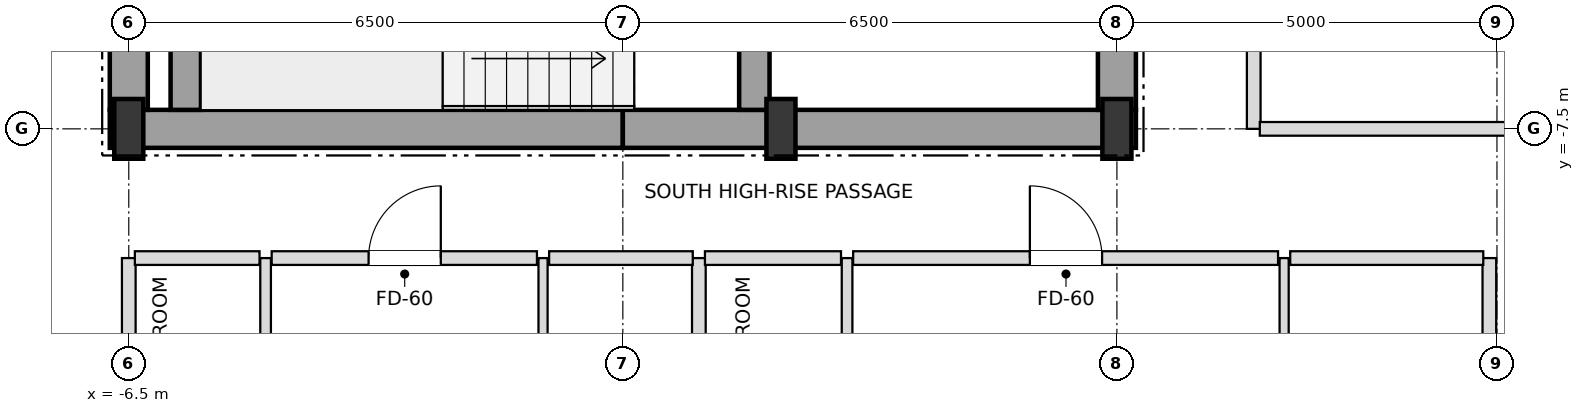
"""IFC4 building model, lengths in metres.
Left out: names, types, materials, properties, quantities, classifications, styles, units other than length and angle.
Written with IfcOpenShell. Run it as: python <this file> out.ifc"""

import sys

from ifc_helpers import new_model, si_unit, direction, frame, frame_2d, origin, origin_2d, place, context, subcontext, project, spatial, rectangle, i_section, extrude, element, fill, save


model = new_model("IFC4")
c1 = context("Model", 3, precision=1e-05, world=origin(), true_north=direction((0.0, 1.0)))
c2 = subcontext(c1, "Body", "Model", "MODEL_VIEW")
j1 = project(units=[si_unit("LENGTHUNIT", "METRE"), si_unit("PLANEANGLEUNIT", "RADIAN")], contexts=[c1])
p1 = place(None, origin())
s1 = spatial("IfcSite", under=j1, at=p1, CompositionType="ELEMENT")
p2 = place(p1, origin())
s2 = spatial("IfcBuilding", under=s1, at=p2, CompositionType="ELEMENT")
p3 = place(p2, frame((0.0, 0.0, 297.9)))
s3 = spatial("IfcBuildingStorey", under=s2, at=p3, CompositionType="ELEMENT", Elevation=297.9)
for number, where, z_axis, x_axis in (
    (1, (-6.5, -7.5, 0.0), (0.0, 0.0, 1.0), (1.0, 0.0, 0.0)),
    (2, (2.08, -7.5, 0.0), (0.0, 0.0, 1.0), (1.0, 0.0, 0.0)),
    (3, (6.5, -7.5, 0.0), (0.0, 0.0, 1.0), (1.0, 0.0, 0.0)),
):
    element("IfcColumn", number, at=place(p3, frame(where, z_axis=z_axis, x_axis=x_axis)), inside=s3, PredefinedType="COLUMN", context=c2, shape_type="SweptSolid", body=[
        extrude(i_section(OverallWidth=0.382, OverallDepth=0.786, WebThickness=0.02, FlangeThickness=0.033, at=origin_2d()), origin(), (0.0, 0.0, 1.0), 3.6),
    ])
for number, where, z_axis, x_axis in (
    (4, (-6.75, -7.5, 0.0), (0.0, 0.0, 1.0), (1.0, 0.0, 0.0)),
    (5, (0.0, -7.5, 0.0), (0.0, 0.0, 1.0), (1.0, 0.0, 0.0)),
):
    element("IfcWall", number, at=place(p3, frame(where, z_axis=z_axis, x_axis=x_axis)), inside=s3, PredefinedType="SHEAR", context=c2, shape_type="SweptSolid", body=[
        extrude(rectangle(XDim=6.75, YDim=0.5, at=frame_2d((3.375, 0.0))), origin(), (0.0, 0.0, 1.0), 3.38),
    ])
p4 = place(p3, frame((-6.5, -7.25, 0.0), z_axis=(0.0, 0.0, 1.0), x_axis=(0.0, 1.0, 0.0)))
e6 = element("IfcWall", 6, at=p4, inside=s3, PredefinedType="SHEAR", context=c2, shape_type="SweptSolid", body=[
    extrude(rectangle(XDim=3.55, YDim=0.5, at=frame_2d((1.775, 0.0))), origin(), (0.0, 0.0, 1.0), 3.38),
])
p5 = place(p3, frame((6.5, -7.25, 0.0), z_axis=(0.0, 0.0, 1.0), x_axis=(0.0, 1.0, 0.0)))
e7 = element("IfcWall", 7, at=p5, inside=s3, PredefinedType="SHEAR", context=c2, shape_type="SweptSolid", body=[
    extrude(rectangle(XDim=5.75, YDim=0.5, at=frame_2d((2.875, 0.0))), origin(), (0.0, 0.0, 1.0), 3.38),
])
p6 = place(p5, frame((0.85, 0.0, 0.0)))
e8 = element("IfcOpeningElement", 8, at=p6, cuts=e7, PredefinedType="OPENING", context=c2, shape_type="SweptSolid", body=[
    extrude(rectangle(XDim=1.05, YDim=2.15, at=frame_2d((0.525, 1.075))), frame((0.0, 0.26, 0.0), z_axis=(0.0, -1.0, 0.0), x_axis=(1.0, 0.0, 0.0)), (0.0, 0.0, 1.0), 0.52),
])
p7 = place(p3, frame((-5.75, -7.25, 0.0), z_axis=(0.0, 0.0, 1.0), x_axis=(0.0, 1.0, 0.0)))
e9 = element("IfcWall", 9, at=p7, inside=s3, PredefinedType="SHEAR", context=c2, shape_type="SweptSolid", body=[
    extrude(rectangle(XDim=2.9, YDim=0.4, at=frame_2d((1.45, 0.0))), origin(), (0.0, 0.0, 1.0), 3.38),
])
p8 = place(p3, frame((1.73, -7.25, 0.0), z_axis=(0.0, 0.0, 1.0), x_axis=(0.0, 1.0, 0.0)))
e10 = element("IfcWall", 10, at=p8, inside=s3, PredefinedType="SHEAR", context=c2, shape_type="SweptSolid", body=[
    extrude(rectangle(XDim=3.3, YDim=0.4, at=frame_2d((1.65, 0.0))), origin(), (0.0, 0.0, 1.0), 3.38),
])
p9 = place(p8, frame((0.9, 0.0, 0.0)))
e11 = element("IfcOpeningElement", 11, at=p9, cuts=e10, PredefinedType="OPENING", context=c2, shape_type="SweptSolid", body=[
    extrude(rectangle(XDim=1.05, YDim=2.15, at=frame_2d((0.525, 1.075))), frame((0.0, 0.21, 0.0), z_axis=(0.0, -1.0, 0.0), x_axis=(1.0, 0.0, 0.0)), (0.0, 0.0, 1.0), 0.42),
])
p10 = place(p3, frame((-6.5, -19.9, 0.0), z_axis=(0.0, 0.0, 1.0), x_axis=(0.0, 1.0, 0.0)))
e12 = element("IfcWall", 12, at=p10, inside=s3, PredefinedType="PARTITIONING", context=c2, shape_type="SweptSolid", body=[
    extrude(rectangle(XDim=10.7, YDim=0.18, at=frame_2d((5.35, 0.0))), origin(), (0.0, 0.0, 1.0), 2.826),
])
p11 = place(p3, frame((-4.7, -13.9, 0.0), z_axis=(0.0, 0.0, 1.0), x_axis=(0.0, 1.0, 0.0)))
e13 = element("IfcWall", 13, at=p11, inside=s3, PredefinedType="PARTITIONING", context=c2, shape_type="SweptSolid", body=[
    extrude(rectangle(XDim=4.7, YDim=0.14, at=frame_2d((2.35, 0.0))), origin(), (0.0, 0.0, 1.0), 3.38),
])
p12 = place(p11, frame((1.9, 0.0, 0.0)))
e14 = element("IfcOpeningElement", 14, at=p12, cuts=e13, PredefinedType="OPENING", context=c2, shape_type="SweptSolid", body=[
    extrude(rectangle(XDim=0.9, YDim=2.1, at=frame_2d((0.45, 1.05))), frame((0.0, 0.08, 0.0), z_axis=(0.0, -1.0, 0.0), x_axis=(1.0, 0.0, 0.0)), (0.0, 0.0, 1.0), 0.16),
])
p13 = place(p3, frame((-1.05, -13.9, 0.0), z_axis=(0.0, 0.0, 1.0), x_axis=(0.0, 1.0, 0.0)))
e15 = element("IfcWall", 15, at=p13, inside=s3, PredefinedType="PARTITIONING", context=c2, shape_type="SweptSolid", body=[
    extrude(rectangle(XDim=4.7, YDim=0.12, at=frame_2d((2.35, 0.0))), origin(), (0.0, 0.0, 1.0), 3.38),
])
p14 = place(p13, frame((1.875, 0.0, 0.0)))
e16 = element("IfcOpeningElement", 16, at=p14, cuts=e15, PredefinedType="OPENING", context=c2, shape_type="SweptSolid", body=[
    extrude(rectangle(XDim=0.95, YDim=2.1, at=frame_2d((0.475, 1.05))), frame((0.0, 0.07, 0.0), z_axis=(0.0, -1.0, 0.0), x_axis=(1.0, 0.0, 0.0)), (0.0, 0.0, 1.0), 0.14),
])
p15 = place(p3, frame((1.0, -19.9, 0.0), z_axis=(0.0, 0.0, 1.0), x_axis=(0.0, 1.0, 0.0)))
e17 = element("IfcWall", 17, at=p15, inside=s3, PredefinedType="PARTITIONING", context=c2, shape_type="SweptSolid", body=[
    extrude(rectangle(XDim=10.7, YDim=0.18, at=frame_2d((5.35, 0.0))), origin(), (0.0, 0.0, 1.0), 3.018),
])
p16 = place(p3, frame((2.95, -13.9, 0.0), z_axis=(0.0, 0.0, 1.0), x_axis=(0.0, 1.0, 0.0)))
e18 = element("IfcWall", 18, at=p16, inside=s3, PredefinedType="PARTITIONING", context=c2, shape_type="SweptSolid", body=[
    extrude(rectangle(XDim=4.7, YDim=0.14, at=frame_2d((2.35, 0.0))), origin(), (0.0, 0.0, 1.0), 3.38),
])
p17 = place(p16, frame((1.9, 0.0, 0.0)))
e19 = element("IfcOpeningElement", 19, at=p17, cuts=e18, PredefinedType="OPENING", context=c2, shape_type="SweptSolid", body=[
    extrude(rectangle(XDim=0.9, YDim=2.1, at=frame_2d((0.45, 1.05))), frame((0.0, 0.08, 0.0), z_axis=(0.0, -1.0, 0.0), x_axis=(1.0, 0.0, 0.0)), (0.0, 0.0, 1.0), 0.16),
])
p18 = place(p3, frame((8.3, -7.5, 0.0), z_axis=(0.0, 0.0, 1.0), x_axis=(0.0, 1.0, 0.0)))
e20 = element("IfcWall", 20, at=p18, inside=s3, PredefinedType="PARTITIONING", context=c2, shape_type="SweptSolid", body=[
    extrude(rectangle(XDim=6.0, YDim=0.18, at=frame_2d((3.0, 0.0))), origin(), (0.0, 0.0, 1.0), 3.38),
])
p19 = place(p18, frame((1.425, 0.0, 0.0)))
e21 = element("IfcOpeningElement", 21, at=p19, cuts=e20, PredefinedType="OPENING", context=c2, shape_type="SweptSolid", body=[
    extrude(rectangle(XDim=0.95, YDim=2.15, at=frame_2d((0.475, 1.075))), frame((0.0, 0.1, 0.0), z_axis=(0.0, -1.0, 0.0), x_axis=(1.0, 0.0, 0.0)), (0.0, 0.0, 1.0), 0.2),
])
p20 = place(p3, frame((8.7, -19.9, 0.0), z_axis=(0.0, 0.0, 1.0), x_axis=(0.0, 1.0, 0.0)))
e22 = element("IfcWall", 22, at=p20, inside=s3, PredefinedType="PARTITIONING", context=c2, shape_type="SweptSolid", body=[
    extrude(rectangle(XDim=10.7, YDim=0.12, at=frame_2d((5.35, 0.0))), origin(), (0.0, 0.0, 1.0), 2.826),
])
p21 = place(p20, frame((7.875, 0.0, 0.0)))
e23 = element("IfcOpeningElement", 23, at=p21, cuts=e22, PredefinedType="OPENING", context=c2, shape_type="SweptSolid", body=[
    extrude(rectangle(XDim=0.95, YDim=2.1, at=frame_2d((0.475, 1.05))), frame((0.0, 0.07, 0.0), z_axis=(0.0, -1.0, 0.0), x_axis=(1.0, 0.0, 0.0)), (0.0, 0.0, 1.0), 0.14),
])
p22 = place(p20, frame((2.55, 0.0, 0.0)))
e24 = element("IfcOpeningElement", 24, at=p22, cuts=e22, PredefinedType="OPENING", context=c2, shape_type="SweptSolid", body=[
    extrude(rectangle(XDim=0.9, YDim=2.1, at=frame_2d((0.45, 1.05))), frame((0.0, 0.07, 0.0), z_axis=(0.0, -1.0, 0.0), x_axis=(1.0, 0.0, 0.0)), (0.0, 0.0, 1.0), 0.14),
])
p23 = place(p3, frame((11.4, -14.27, 0.0), z_axis=(0.0, 0.0, 1.0), x_axis=(0.0, 1.0, 0.0)))
e25 = element("IfcWall", 25, at=p23, inside=s3, PredefinedType="PARTITIONING", context=c2, shape_type="SweptSolid", body=[
    extrude(rectangle(XDim=5.07, YDim=0.18, at=frame_2d((2.535, 0.0))), origin(), (0.0, 0.0, 1.0), 2.748),
])
p24 = place(p3, frame((-6.42, -9.2, 0.0), z_axis=(0.0, 0.0, 1.0), x_axis=(1.0, 0.0, 0.0)))
e26 = element("IfcWall", 26, at=p24, inside=s3, PredefinedType="PARTITIONING", context=c2, shape_type="SweptSolid", body=[
    extrude(rectangle(XDim=1.64, YDim=0.18, at=frame_2d((0.82, 0.0))), origin(), (0.0, 0.0, 1.0), 3.38),
])
p25 = place(p3, frame((-4.62, -9.2, 0.0), z_axis=(0.0, 0.0, 1.0), x_axis=(1.0, 0.0, 0.0)))
e27 = element("IfcWall", 27, at=p25, inside=s3, PredefinedType="PARTITIONING", context=c2, shape_type="SweptSolid", body=[
    extrude(rectangle(XDim=3.49, YDim=0.18, at=frame_2d((1.745, 0.0))), origin(), (0.0, 0.0, 1.0), 3.38),
])
p26 = place(p25, frame((1.275, 0.0, 0.0)))
e28 = element("IfcOpeningElement", 28, at=p26, cuts=e27, PredefinedType="OPENING", context=c2, shape_type="SweptSolid", body=[
    extrude(rectangle(XDim=0.95, YDim=2.15, at=frame_2d((0.475, 1.075))), frame((0.0, 0.1, 0.0), z_axis=(0.0, -1.0, 0.0), x_axis=(1.0, 0.0, 0.0)), (0.0, 0.0, 1.0), 0.2),
])
p27 = place(p3, frame((-0.97, -9.2, 0.0), z_axis=(0.0, 0.0, 1.0), x_axis=(1.0, 0.0, 0.0)))
e29 = element("IfcWall", 29, at=p27, inside=s3, PredefinedType="PARTITIONING", context=c2, shape_type="SweptSolid", body=[
    extrude(rectangle(XDim=1.89, YDim=0.18, at=frame_2d((0.945, 0.0))), origin(), (0.0, 0.0, 1.0), 3.38),
])
p28 = place(p3, frame((1.08, -9.2, 0.0), z_axis=(0.0, 0.0, 1.0), x_axis=(1.0, 0.0, 0.0)))
e30 = element("IfcWall", 30, at=p28, inside=s3, PredefinedType="PARTITIONING", context=c2, shape_type="SweptSolid", body=[
    extrude(rectangle(XDim=1.79, YDim=0.18, at=frame_2d((0.895, 0.0))), origin(), (0.0, 0.0, 1.0), 3.38),
])
p29 = place(p3, frame((3.03, -9.2, 0.0), z_axis=(0.0, 0.0, 1.0), x_axis=(1.0, 0.0, 0.0)))
e31 = element("IfcWall", 31, at=p29, inside=s3, PredefinedType="PARTITIONING", context=c2, shape_type="SweptSolid", body=[
    extrude(rectangle(XDim=5.59, YDim=0.18, at=frame_2d((2.795, 0.0))), origin(), (0.0, 0.0, 1.0), 2.826),
])
p30 = place(p29, frame((2.325, 0.0, 0.0)))
e32 = element("IfcOpeningElement", 32, at=p30, cuts=e31, PredefinedType="OPENING", context=c2, shape_type="SweptSolid", body=[
    extrude(rectangle(XDim=0.95, YDim=2.15, at=frame_2d((0.475, 1.075))), frame((0.0, 0.1, 0.0), z_axis=(0.0, -1.0, 0.0), x_axis=(1.0, 0.0, 0.0)), (0.0, 0.0, 1.0), 0.2),
])
p31 = place(p3, frame((8.78, -9.2, 0.0), z_axis=(0.0, 0.0, 1.0), x_axis=(1.0, 0.0, 0.0)))
e33 = element("IfcWall", 33, at=p31, inside=s3, PredefinedType="PARTITIONING", context=c2, shape_type="SweptSolid", body=[
    extrude(rectangle(XDim=2.54, YDim=0.18, at=frame_2d((1.27, 0.0))), origin(), (0.0, 0.0, 1.0), 3.38),
])
p32 = place(p3, frame((8.38, -7.5, 0.0), z_axis=(0.0, 0.0, 1.0), x_axis=(1.0, 0.0, 0.0)))
e34 = element("IfcWall", 34, at=p32, inside=s3, PredefinedType="PARTITIONING", context=c2, shape_type="SweptSolid", body=[
    extrude(rectangle(XDim=8.52, YDim=0.18, at=frame_2d((4.26, 0.0))), origin(), (0.0, 0.0, 1.0), 2.826),
])
p33 = place(p26, origin())
e35 = element("IfcDoor", 35, at=p33, inside=s3, OperationType="SINGLE_SWING_RIGHT", PredefinedType="DOOR", context=c2, shape_type="SweptSolid", body=[
    extrude(rectangle(XDim=0.95, YDim=2.15, at=frame_2d((0.475, 1.075))), frame((0.0, 0.025, 0.0), z_axis=(0.0, -1.0, 0.0), x_axis=(1.0, 0.0, 0.0)), (0.0, 0.0, 1.0), 0.05),
])
fill(e28, e35)
p34 = place(p30, origin())
e36 = element("IfcDoor", 36, at=p34, inside=s3, OperationType="SINGLE_SWING_LEFT", PredefinedType="DOOR", context=c2, shape_type="SweptSolid", body=[
    extrude(rectangle(XDim=0.95, YDim=2.15, at=frame_2d((0.475, 1.075))), frame((0.0, 0.025, 0.0), z_axis=(0.0, -1.0, 0.0), x_axis=(1.0, 0.0, 0.0)), (0.0, 0.0, 1.0), 0.05),
])
fill(e32, e36)
save(model, sys.argv[1])
